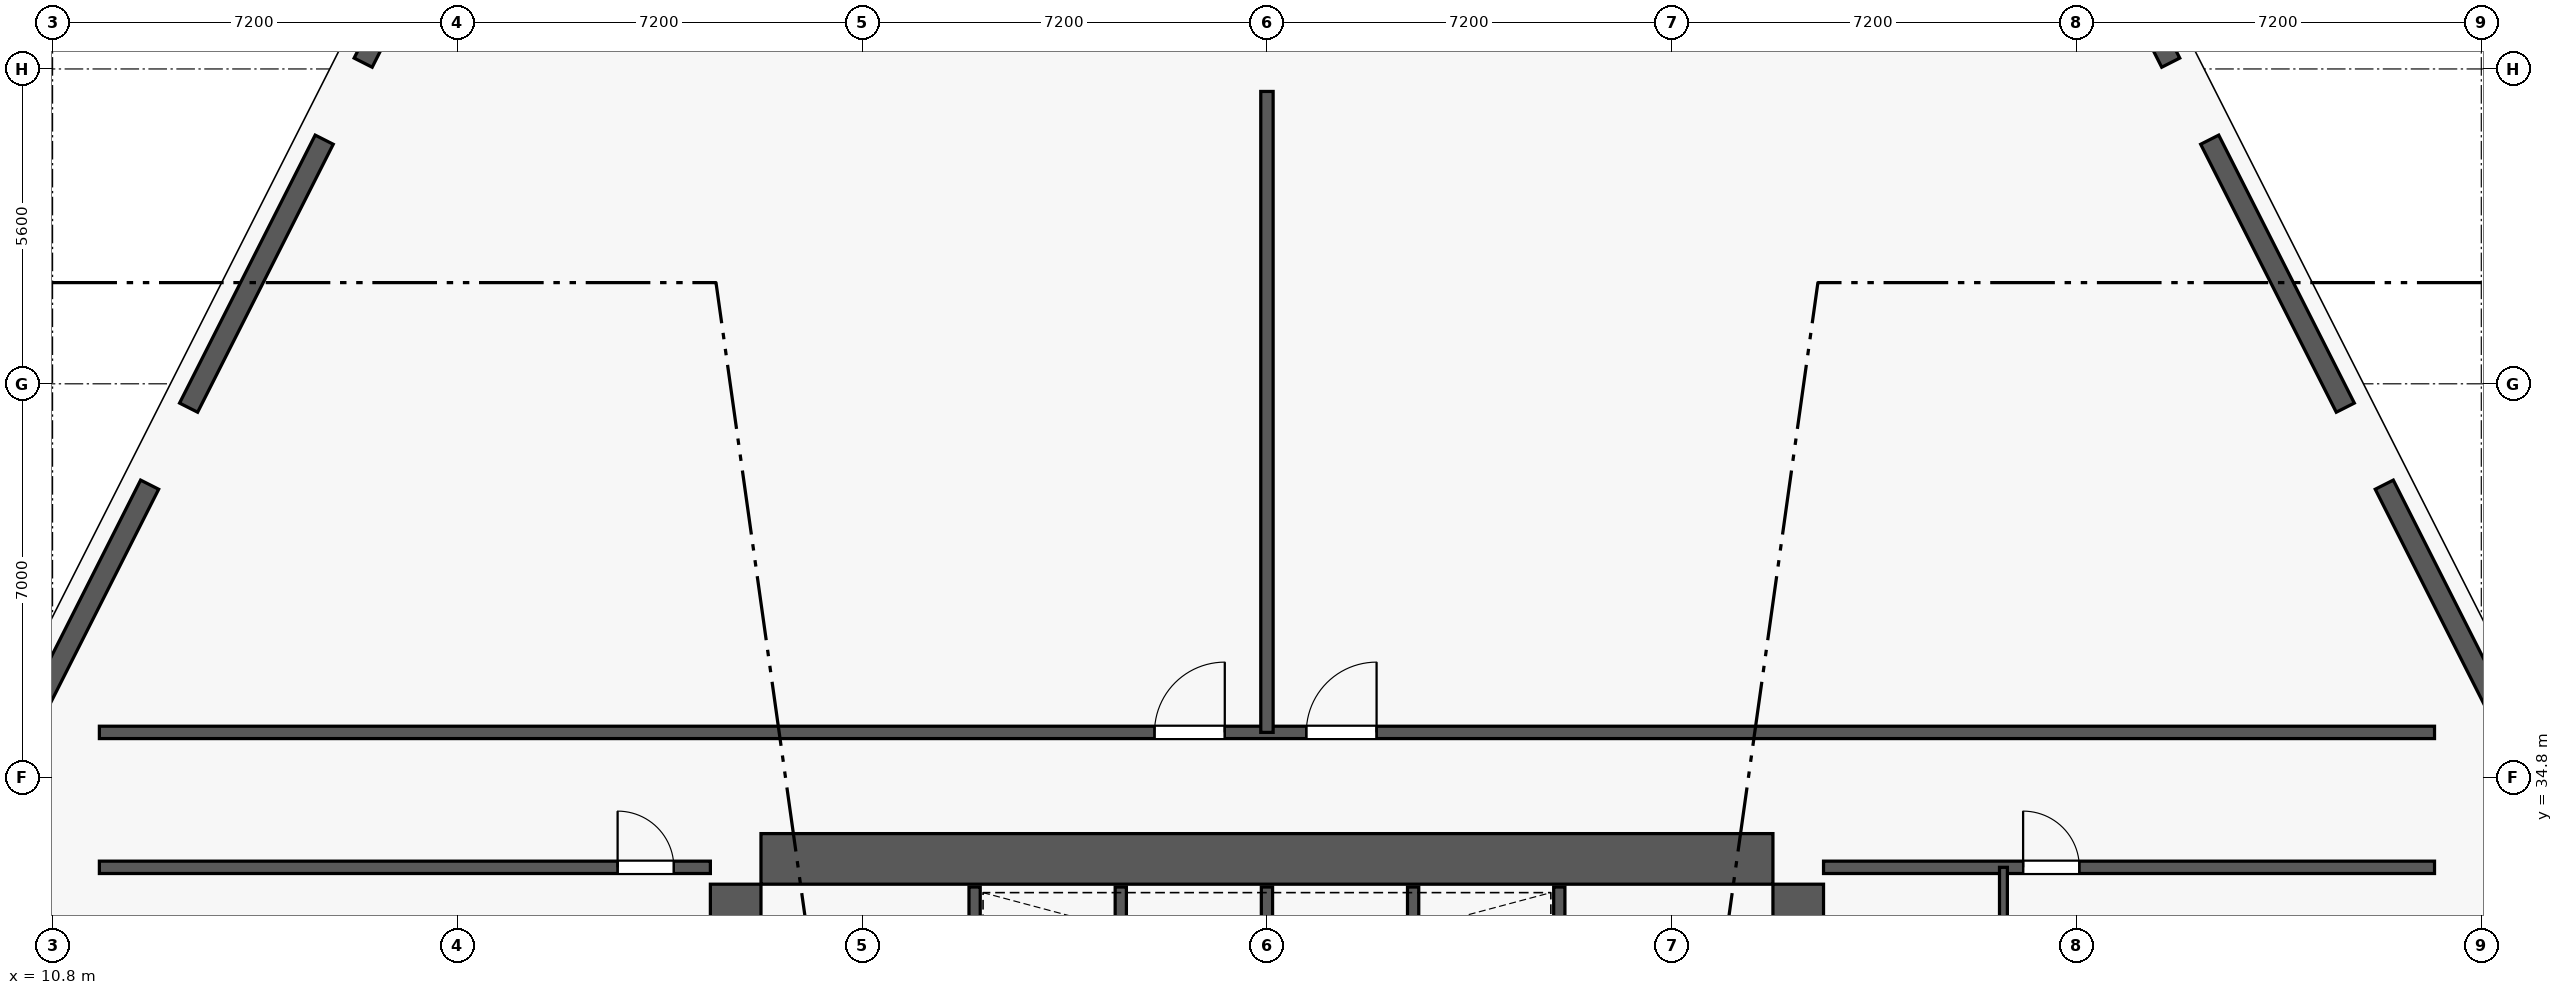
"""IFC4 building model, lengths in metres.
Left out: names, types, materials, properties, quantities, classifications, styles, units other than length and angle.
Written with IfcOpenShell. Run it as: python <this file> out.ifc"""

import sys

from ifc_helpers import new_model, si_unit, direction, frame, frame_2d, origin, origin_2d, place, context, subcontext, project, spatial, rectangle, extrude, element, fill, save


model = new_model("IFC4")
c1 = context("Model", 3, precision=1e-05, world=origin(), true_north=direction((0.0, 1.0)))
c2 = subcontext(c1, "Body", "Model", "MODEL_VIEW")
j1 = project(units=[si_unit("LENGTHUNIT", "METRE"), si_unit("PLANEANGLEUNIT", "RADIAN")], contexts=[c1])
p1 = place(None, origin())
s1 = spatial("IfcSite", under=j1, at=p1, CompositionType="ELEMENT")
p2 = place(p1, origin())
s2 = spatial("IfcBuilding", under=s1, at=p2, CompositionType="ELEMENT")
p3 = place(p2, frame((0.0, 0.0, 74.6)))
s3 = spatial("IfcBuildingStorey", under=s2, at=p3, CompositionType="ELEMENT", Elevation=74.6)
for number, where, z_axis, x_axis in (
    (1, (41.85, 33.35, 0.0), (0.0, 0.0, 1.0), (1.0, 0.0, 0.0)),
    (2, (22.95, 33.35, 0.0), (0.0, 0.0, 1.0), (1.0, 0.0, 0.0)),
):
    element("IfcColumn", number, at=place(p3, frame(where, z_axis=z_axis, x_axis=x_axis)), inside=s3, PredefinedType="COLUMN", context=c2, shape_type="SweptSolid", body=[
        extrude(rectangle(XDim=0.9, YDim=0.9, at=origin_2d()), origin(), (0.0, 0.0, 1.0), 5.4),
    ])
p4 = place(p3, frame((23.4, 33.35, 0.0), z_axis=(0.0, 0.0, 1.0), x_axis=(1.0, 0.0, 0.0)))
e3 = element("IfcWall", 3, at=p4, inside=s3, PredefinedType="SHEAR", context=c2, shape_type="SweptSolid", body=[
    extrude(rectangle(XDim=18.0, YDim=0.9, at=frame_2d((9.0, 0.0))), origin(), (0.0, 0.0, 1.0), 5.18),
])
p5 = place(p3, frame((22.95, 18.9, 0.0), z_axis=(0.0, 0.0, 1.0), x_axis=(0.0, 1.0, 0.0)))
e4 = element("IfcWall", 4, at=p5, inside=s3, PredefinedType="SHEAR", context=c2, shape_type="SweptSolid", body=[
    extrude(rectangle(XDim=14.0, YDim=0.9, at=frame_2d((7.0, 0.0))), origin(), (0.0, 0.0, 1.0), 5.18),
])
p6 = place(p5, frame((2.94, 0.0, 0.0)))
e5 = element("IfcOpeningElement", 5, at=p6, cuts=e4, PredefinedType="OPENING", context=c2, shape_type="SweptSolid", body=[
    extrude(rectangle(XDim=1.22, YDim=2.25, at=frame_2d((0.61, 1.125))), frame((0.0, 0.46, 0.0), z_axis=(0.0, -1.0, 0.0), x_axis=(1.0, 0.0, 0.0)), (0.0, 0.0, 1.0), 0.92),
])
p7 = place(p3, frame((41.85, 18.9, 0.0), z_axis=(0.0, 0.0, 1.0), x_axis=(0.0, 1.0, 0.0)))
e6 = element("IfcWall", 6, at=p7, inside=s3, PredefinedType="SHEAR", context=c2, shape_type="SweptSolid", body=[
    extrude(rectangle(XDim=14.0, YDim=0.9, at=frame_2d((7.0, 0.0))), origin(), (0.0, 0.0, 1.0), 5.18),
])
p8 = place(p7, frame((2.94, 0.0, 0.0)))
e7 = element("IfcOpeningElement", 7, at=p8, cuts=e6, PredefinedType="OPENING", context=c2, shape_type="SweptSolid", body=[
    extrude(rectangle(XDim=1.22, YDim=2.25, at=frame_2d((0.61, 1.125))), frame((0.0, 0.46, 0.0), z_axis=(0.0, -1.0, 0.0), x_axis=(1.0, 0.0, 0.0)), (0.0, 0.0, 1.0), 0.92),
])
for number, where, z_axis, x_axis in (
    (8, (51.859, 40.691, 0.0), (0.0, 0.0, 1.0), (1.0, 0.0, 0.0)),
    (9, (48.803, 46.827, 0.0), (0.0, 0.0, 1.0), (1.0, 0.0, 0.0)),
    (10, (15.997, 46.827, 0.0), (0.0, 0.0, 1.0), (1.0, 0.0, 0.0)),
    (11, (12.941, 40.691, 0.0), (0.0, 0.0, 1.0), (1.0, 0.0, 0.0)),
):
    element("IfcColumn", number, at=place(p3, frame(where, z_axis=z_axis, x_axis=x_axis)), inside=s3, PredefinedType="COLUMN", context=c2, shape_type="SweptSolid", body=[
        extrude(rectangle(XDim=1.2, YDim=1.2, at=origin_2d()), origin(), (0.0, 0.0, 1.0), 5.4),
    ])
for number, where, z_axis, x_axis in (
    (12, (27.2, 30.0, 0.0), (0.0, 0.0, 1.0), (0.0, 1.0, 0.0)),
    (13, (29.8, 30.0, 0.0), (0.0, 0.0, 1.0), (0.0, 1.0, 0.0)),
    (14, (32.4, 30.0, 0.0), (0.0, 0.0, 1.0), (0.0, 1.0, 0.0)),
    (15, (35.0, 30.0, 0.0), (0.0, 0.0, 1.0), (0.0, 1.0, 0.0)),
    (16, (37.6, 30.0, 0.0), (0.0, 0.0, 1.0), (0.0, 1.0, 0.0)),
):
    element("IfcWall", number, at=place(p3, frame(where, z_axis=z_axis, x_axis=x_axis)), inside=s3, PredefinedType="PLUMBINGWALL", context=c2, shape_type="SweptSolid", body=[
        extrude(rectangle(XDim=2.85, YDim=0.2, at=frame_2d((1.425, 0.0))), origin(), (0.0, 0.0, 1.0), 5.18),
    ])
p9 = place(p3, frame((11.632, 33.2, 0.0), z_axis=(0.0, 0.0, 1.0), x_axis=(1.0, 0.0, 0.0)))
e17 = element("IfcWall", 17, at=p9, inside=s3, PredefinedType="PARTITIONING", context=c2, shape_type="SweptSolid", body=[
    extrude(rectangle(XDim=10.868, YDim=0.22, at=frame_2d((5.434, 0.0))), origin(), (0.0, 0.0, 1.0), 4.487),
])
p10 = place(p9, frame((9.218, 0.0, 0.0)))
e18 = element("IfcOpeningElement", 18, at=p10, cuts=e17, PredefinedType="OPENING", context=c2, shape_type="SweptSolid", body=[
    extrude(rectangle(XDim=1.0, YDim=2.15, at=frame_2d((0.5, 1.075))), frame((0.0, 0.12, 0.0), z_axis=(0.0, -1.0, 0.0), x_axis=(1.0, 0.0, 0.0)), (0.0, 0.0, 1.0), 0.24),
])
p11 = place(p3, frame((42.3, 33.2, 0.0), z_axis=(0.0, 0.0, 1.0), x_axis=(1.0, 0.0, 0.0)))
e19 = element("IfcWall", 19, at=p11, inside=s3, PredefinedType="PARTITIONING", context=c2, shape_type="SweptSolid", body=[
    extrude(rectangle(XDim=10.868, YDim=0.22, at=frame_2d((5.434, 0.0))), origin(), (0.0, 0.0, 1.0), 4.487),
])
p12 = place(p11, frame((3.55, 0.0, 0.0)))
e20 = element("IfcOpeningElement", 20, at=p12, cuts=e19, PredefinedType="OPENING", context=c2, shape_type="SweptSolid", body=[
    extrude(rectangle(XDim=1.0, YDim=2.15, at=frame_2d((0.5, 1.075))), frame((0.0, 0.12, 0.0), z_axis=(0.0, -1.0, 0.0), x_axis=(1.0, 0.0, 0.0)), (0.0, 0.0, 1.0), 0.24),
])
p13 = place(p3, frame((45.5, 29.8, 0.0), z_axis=(0.0, 0.0, 1.0), x_axis=(0.0, 1.0, 0.0)))
e21 = element("IfcWall", 21, at=p13, inside=s3, PredefinedType="PLUMBINGWALL", context=c2, shape_type="SweptSolid", body=[
    extrude(rectangle(XDim=3.4, YDim=0.14, at=frame_2d((1.7, 0.0))), origin(), (0.0, 0.0, 1.0), 5.18),
])
p14 = place(p3, frame((11.632, 35.6, 0.0), z_axis=(0.0, 0.0, 1.0), x_axis=(1.0, 0.0, 0.0)))
e22 = element("IfcWall", 22, at=p14, inside=s3, PredefinedType="PARTITIONING", context=c2, shape_type="SweptSolid", body=[
    extrude(rectangle(XDim=41.536, YDim=0.22, at=frame_2d((20.768, 0.0))), origin(), (0.0, 0.0, 1.0), 5.18),
])
p15 = place(p14, frame((18.768, 0.0, 0.0)))
e23 = element("IfcOpeningElement", 23, at=p15, cuts=e22, PredefinedType="OPENING", context=c2, shape_type="SweptSolid", body=[
    extrude(rectangle(XDim=1.25, YDim=2.25, at=frame_2d((0.625, 1.125))), frame((0.0, 0.12, 0.0), z_axis=(0.0, -1.0, 0.0), x_axis=(1.0, 0.0, 0.0)), (0.0, 0.0, 1.0), 0.24),
])
p16 = place(p14, frame((21.468, 0.0, 0.0)))
e24 = element("IfcOpeningElement", 24, at=p16, cuts=e22, PredefinedType="OPENING", context=c2, shape_type="SweptSolid", body=[
    extrude(rectangle(XDim=1.25, YDim=2.25, at=frame_2d((0.625, 1.125))), frame((0.0, 0.12, 0.0), z_axis=(0.0, -1.0, 0.0), x_axis=(1.0, 0.0, 0.0)), (0.0, 0.0, 1.0), 0.24),
])
p17 = place(p3, frame((32.4, 35.6, 0.0), z_axis=(0.0, 0.0, 1.0), x_axis=(0.0, 1.0, 0.0)))
e25 = element("IfcWall", 25, at=p17, inside=s3, PredefinedType="PARTITIONING", context=c2, shape_type="SweptSolid", body=[
    extrude(rectangle(XDim=11.4, YDim=0.22, at=frame_2d((5.7, 0.0))), origin(), (0.0, 0.0, 1.0), 5.18),
])
p18 = place(p3, frame((54.774, 35.065, 0.0), z_axis=(0.0, 0.0, 1.0), x_axis=(-0.451458606243, 0.892292063648, 0.0)))
e26 = element("IfcWall", 26, at=p18, inside=s3, PredefinedType="STANDARD", context=c2, shape_type="SweptSolid", body=[
    extrude(rectangle(XDim=5.538, YDim=0.36, at=frame_2d((2.769, 0.0))), origin(), (0.0, 0.0, 1.0), 4.637),
])
p19 = place(p3, frame((51.581, 41.376, 0.0), z_axis=(0.0, 0.0, 1.0), x_axis=(-0.451559361714, 0.892241078884, 0.0)))
e27 = element("IfcWall", 27, at=p19, inside=s3, PredefinedType="STANDARD", context=c2, shape_type="SweptSolid", body=[
    extrude(rectangle(XDim=5.342, YDim=0.36, at=frame_2d((2.671, 0.0))), origin(), (0.0, 0.0, 1.0), 4.637),
])
for number, where, z_axis, x_axis in (
    (28, (48.476, 47.512, 0.0), (0.0, 0.0, 1.0), (-0.451, 0.892, 0.0)),
    (29, (16.701, 48.257, 0.0), (0.0, 0.0, 1.0), (-0.451, -0.892, 0.0)),
):
    element("IfcWall", number, at=place(p3, frame(where, z_axis=z_axis, x_axis=x_axis)), inside=s3, PredefinedType="STANDARD", context=c2, shape_type="SweptSolid", body=[
        extrude(rectangle(XDim=0.835, YDim=0.36, at=frame_2d((0.417, 0.0))), origin(), (0.0, 0.0, 1.0), 5.18),
    ])
p20 = place(p3, frame((15.631, 46.142, 0.0), z_axis=(0.0, 0.0, 1.0), x_axis=(-0.451559361714, -0.892241078884, 0.0)))
e30 = element("IfcWall", 30, at=p20, inside=s3, PredefinedType="STANDARD", context=c2, shape_type="SweptSolid", body=[
    extrude(rectangle(XDim=5.342, YDim=0.36, at=frame_2d((2.671, 0.0))), origin(), (0.0, 0.0, 1.0), 4.637),
])
p21 = place(p3, frame((12.526, 40.006, 0.0), z_axis=(0.0, 0.0, 1.0), x_axis=(-0.451458606243, -0.892292063648, 0.0)))
e31 = element("IfcWall", 31, at=p21, inside=s3, PredefinedType="STANDARD", context=c2, shape_type="SweptSolid", body=[
    extrude(rectangle(XDim=5.538, YDim=0.36, at=frame_2d((2.769, 0.0))), origin(), (0.0, 0.0, 1.0), 4.637),
])
p22 = place(p10, origin())
e32 = element("IfcDoor", 32, at=p22, inside=s3, OperationType="SINGLE_SWING_LEFT", PredefinedType="DOOR", context=c2, shape_type="SweptSolid", body=[
    extrude(rectangle(XDim=1.0, YDim=2.15, at=frame_2d((0.5, 1.075))), frame((0.0, 0.025, 0.0), z_axis=(0.0, -1.0, 0.0), x_axis=(1.0, 0.0, 0.0)), (0.0, 0.0, 1.0), 0.05),
])
fill(e18, e32)
p23 = place(p12, origin())
e33 = element("IfcDoor", 33, at=p23, inside=s3, OperationType="SINGLE_SWING_LEFT", PredefinedType="DOOR", context=c2, shape_type="SweptSolid", body=[
    extrude(rectangle(XDim=1.0, YDim=2.15, at=frame_2d((0.5, 1.075))), frame((0.0, 0.025, 0.0), z_axis=(0.0, -1.0, 0.0), x_axis=(1.0, 0.0, 0.0)), (0.0, 0.0, 1.0), 0.05),
])
fill(e20, e33)
p24 = place(p15, origin())
e34 = element("IfcDoor", 34, at=p24, inside=s3, OperationType="SINGLE_SWING_RIGHT", PredefinedType="DOOR", context=c2, shape_type="SweptSolid", body=[
    extrude(rectangle(XDim=1.25, YDim=2.25, at=frame_2d((0.625, 1.125))), frame((0.0, 0.025, 0.0), z_axis=(0.0, -1.0, 0.0), x_axis=(1.0, 0.0, 0.0)), (0.0, 0.0, 1.0), 0.05),
])
fill(e23, e34)
p25 = place(p16, origin())
e35 = element("IfcDoor", 35, at=p25, inside=s3, OperationType="SINGLE_SWING_RIGHT", PredefinedType="DOOR", context=c2, shape_type="SweptSolid", body=[
    extrude(rectangle(XDim=1.25, YDim=2.25, at=frame_2d((0.625, 1.125))), frame((0.0, 0.025, 0.0), z_axis=(0.0, -1.0, 0.0), x_axis=(1.0, 0.0, 0.0)), (0.0, 0.0, 1.0), 0.05),
])
fill(e24, e35)
save(model, sys.argv[1])
